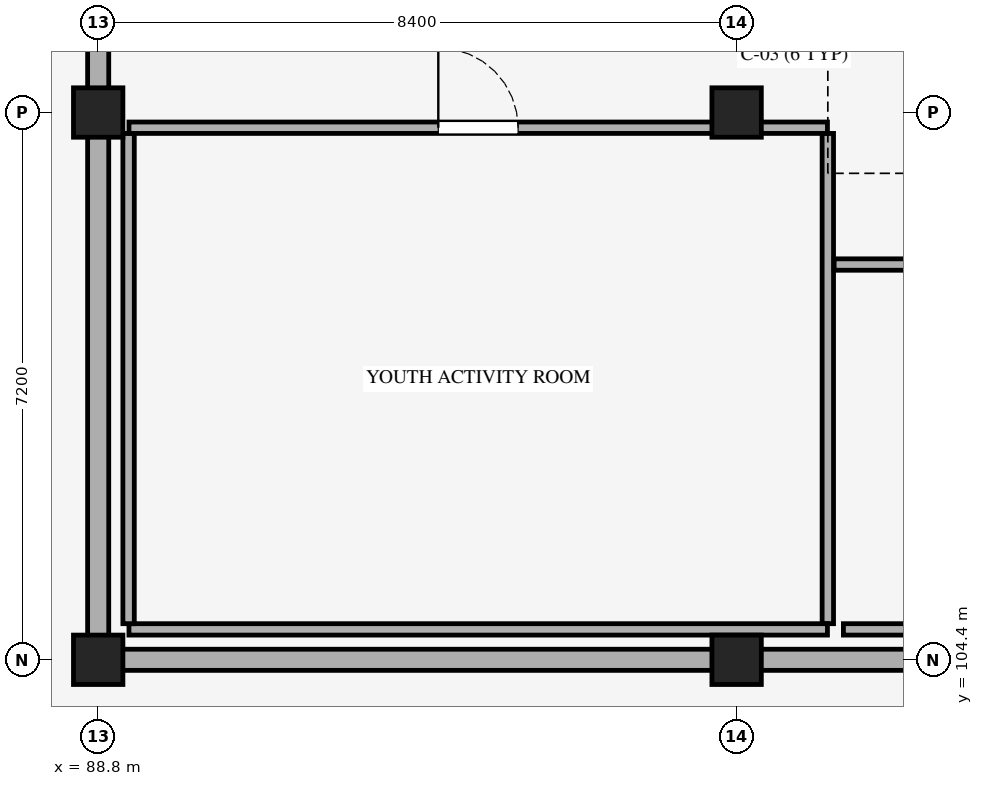
"""IFC4 building model, lengths in metres.
Left out: names, types, materials, properties, quantities, classifications, styles, units other than length and angle.
Written with IfcOpenShell. Run it as: python <this file> out.ifc"""

import sys

from ifc_helpers import new_model, si_unit, direction, frame, frame_2d, origin, origin_2d, place, context, subcontext, project, spatial, rectangle, extrude, element, fill, save


model = new_model("IFC4")
c1 = context("Model", 3, precision=1e-05, world=origin(), true_north=direction((0.0, 1.0)))
c2 = subcontext(c1, "Body", "Model", "MODEL_VIEW")
j1 = project(units=[si_unit("LENGTHUNIT", "METRE"), si_unit("PLANEANGLEUNIT", "RADIAN")], contexts=[c1])
p1 = place(None, origin())
s1 = spatial("IfcSite", under=j1, at=p1, CompositionType="ELEMENT")
p2 = place(p1, origin())
s2 = spatial("IfcBuilding", under=s1, at=p2, CompositionType="ELEMENT")
p3 = place(p2, frame((0.0, 0.0, 13.5)))
s3 = spatial("IfcBuildingStorey", under=s2, at=p3, CompositionType="ELEMENT", Elevation=13.5)
for number, where, z_axis, x_axis in (
    (1, (88.8, 104.4, 0.0), (0.0, 0.0, 1.0), (1.0, 0.0, 0.0)),
    (2, (88.8, 111.6, 0.0), (0.0, 0.0, 1.0), (1.0, 0.0, 0.0)),
    (3, (97.2, 104.4, 0.0), (0.0, 0.0, 1.0), (1.0, 0.0, 0.0)),
    (4, (97.2, 111.6, 0.0), (0.0, 0.0, 1.0), (1.0, 0.0, 0.0)),
):
    element("IfcColumn", number, at=place(p3, frame(where, z_axis=z_axis, x_axis=x_axis)), inside=s3, PredefinedType="COLUMN", context=c2, shape_type="SweptSolid", body=[
        extrude(rectangle(XDim=0.65, YDim=0.65, at=origin_2d()), origin(), (0.0, 0.0, 1.0), 3.9),
    ])
p4 = place(p3, frame((105.6, 104.4, 0.0), z_axis=(0.0, 0.0, 1.0), x_axis=(-1.0, 0.0, 0.0)))
e5 = element("IfcWall", 5, at=p4, inside=s3, PredefinedType="STANDARD", context=c2, shape_type="SweptSolid", body=[
    extrude(rectangle(XDim=8.4, YDim=0.278, at=frame_2d((4.2, 0.0))), origin(), (0.0, 0.0, 1.0), 2.905),
])
p5 = place(p3, frame((97.2, 104.4, 0.0), z_axis=(0.0, 0.0, 1.0), x_axis=(-1.0, 0.0, 0.0)))
e6 = element("IfcWall", 6, at=p5, inside=s3, PredefinedType="STANDARD", context=c2, shape_type="SweptSolid", body=[
    extrude(rectangle(XDim=8.4, YDim=0.278, at=frame_2d((4.2, 0.0))), origin(), (0.0, 0.0, 1.0), 2.905),
])
p6 = place(p3, frame((88.8, 104.4, 0.0), z_axis=(0.0, 0.0, 1.0), x_axis=(0.0, 1.0, 0.0)))
e7 = element("IfcWall", 7, at=p6, inside=s3, PredefinedType="STANDARD", context=c2, shape_type="SweptSolid", body=[
    extrude(rectangle(XDim=7.2, YDim=0.278, at=frame_2d((3.6, 0.0))), origin(), (0.0, 0.0, 1.0), 2.905),
])
p7 = place(p3, frame((88.8, 111.6, 0.0), z_axis=(0.0, 0.0, 1.0), x_axis=(0.0, 1.0, 0.0)))
e8 = element("IfcWall", 8, at=p7, inside=s3, PredefinedType="STANDARD", context=c2, shape_type="SweptSolid", body=[
    extrude(rectangle(XDim=7.2, YDim=0.278, at=frame_2d((3.6, 0.0))), origin(), (0.0, 0.0, 1.0), 2.905),
])
p8 = place(p3, frame((98.4, 111.325, 0.0), z_axis=(0.0, 0.0, 1.0), x_axis=(0.0, -1.0, 0.0)))
e9 = element("IfcWall", 9, at=p8, inside=s3, PredefinedType="STANDARD", context=c2, shape_type="SweptSolid", body=[
    extrude(rectangle(XDim=6.45, YDim=0.15, at=frame_2d((3.225, 0.0))), origin(), (0.0, 0.0, 1.0), 3.66),
])
p9 = place(p3, frame((98.395, 104.8, 0.0), z_axis=(0.0, 0.0, 1.0), x_axis=(-1.0, 0.0, 0.0)))
e10 = element("IfcWall", 10, at=p9, inside=s3, PredefinedType="STANDARD", context=c2, shape_type="SweptSolid", body=[
    extrude(rectangle(XDim=9.19, YDim=0.15, at=frame_2d((4.595, 0.0))), origin(), (0.0, 0.0, 1.0), 2.905),
])
p10 = place(p3, frame((89.2, 104.875, 0.0), z_axis=(0.0, 0.0, 1.0), x_axis=(0.0, 1.0, 0.0)))
e11 = element("IfcWall", 11, at=p10, inside=s3, PredefinedType="STANDARD", context=c2, shape_type="SweptSolid", body=[
    extrude(rectangle(XDim=6.45, YDim=0.15, at=frame_2d((3.225, 0.0))), origin(), (0.0, 0.0, 1.0), 2.905),
])
p11 = place(p3, frame((89.205, 111.4, 0.0), z_axis=(0.0, 0.0, 1.0), x_axis=(1.0, 0.0, 0.0)))
e12 = element("IfcWall", 12, at=p11, inside=s3, PredefinedType="STANDARD", context=c2, shape_type="SweptSolid", body=[
    extrude(rectangle(XDim=9.19, YDim=0.15, at=frame_2d((4.595, 0.0))), origin(), (0.0, 0.0, 1.0), 2.905),
])
p12 = place(p11, frame((4.07, 0.0, 0.0)))
e13 = element("IfcOpeningElement", 13, at=p12, cuts=e12, PredefinedType="OPENING", context=c2, shape_type="SweptSolid", body=[
    extrude(rectangle(XDim=1.05, YDim=2.15, at=frame_2d((0.525, 1.075))), frame((0.0, 0.085, 0.0), z_axis=(0.0, -1.0, 0.0), x_axis=(1.0, 0.0, 0.0)), (0.0, 0.0, 1.0), 0.17),
])
p13 = place(p3, frame((113.795, 104.8, 0.0), z_axis=(0.0, 0.0, 1.0), x_axis=(-1.0, 0.0, 0.0)))
e14 = element("IfcWall", 14, at=p13, inside=s3, PredefinedType="STANDARD", context=c2, shape_type="SweptSolid", body=[
    extrude(rectangle(XDim=15.19, YDim=0.15, at=frame_2d((7.595, 0.0))), origin(), (0.0, 0.0, 1.0), 2.905),
])
p14 = place(p3, frame((98.483, 109.6, 0.0), z_axis=(0.0, 0.0, 1.0), x_axis=(1.0, 0.0, 0.0)))
e15 = element("IfcWall", 15, at=p14, inside=s3, PredefinedType="STANDARD", context=c2, shape_type="SweptSolid", body=[
    extrude(rectangle(XDim=15.312, YDim=0.15, at=frame_2d((7.656, 0.0))), origin(), (0.0, 0.0, 1.0), 3.305),
])
p15 = place(p14, frame((7.131, 0.0, 0.0)))
e16 = element("IfcOpeningElement", 16, at=p15, cuts=e15, PredefinedType="OPENING", context=c2, shape_type="SweptSolid", body=[
    extrude(rectangle(XDim=1.05, YDim=2.15, at=frame_2d((0.525, 1.075))), frame((0.0, 0.085, 0.0), z_axis=(0.0, -1.0, 0.0), x_axis=(1.0, 0.0, 0.0)), (0.0, 0.0, 1.0), 0.17),
])
p16 = place(p12, origin())
e17 = element("IfcDoor", 17, at=p16, inside=s3, OperationType="SINGLE_SWING_LEFT", PredefinedType="DOOR", context=c2, shape_type="SweptSolid", body=[
    extrude(rectangle(XDim=1.05, YDim=2.15, at=frame_2d((0.525, 1.075))), frame((0.0, 0.025, 0.0), z_axis=(0.0, -1.0, 0.0), x_axis=(1.0, 0.0, 0.0)), (0.0, 0.0, 1.0), 0.05),
])
fill(e13, e17)
save(model, sys.argv[1])
